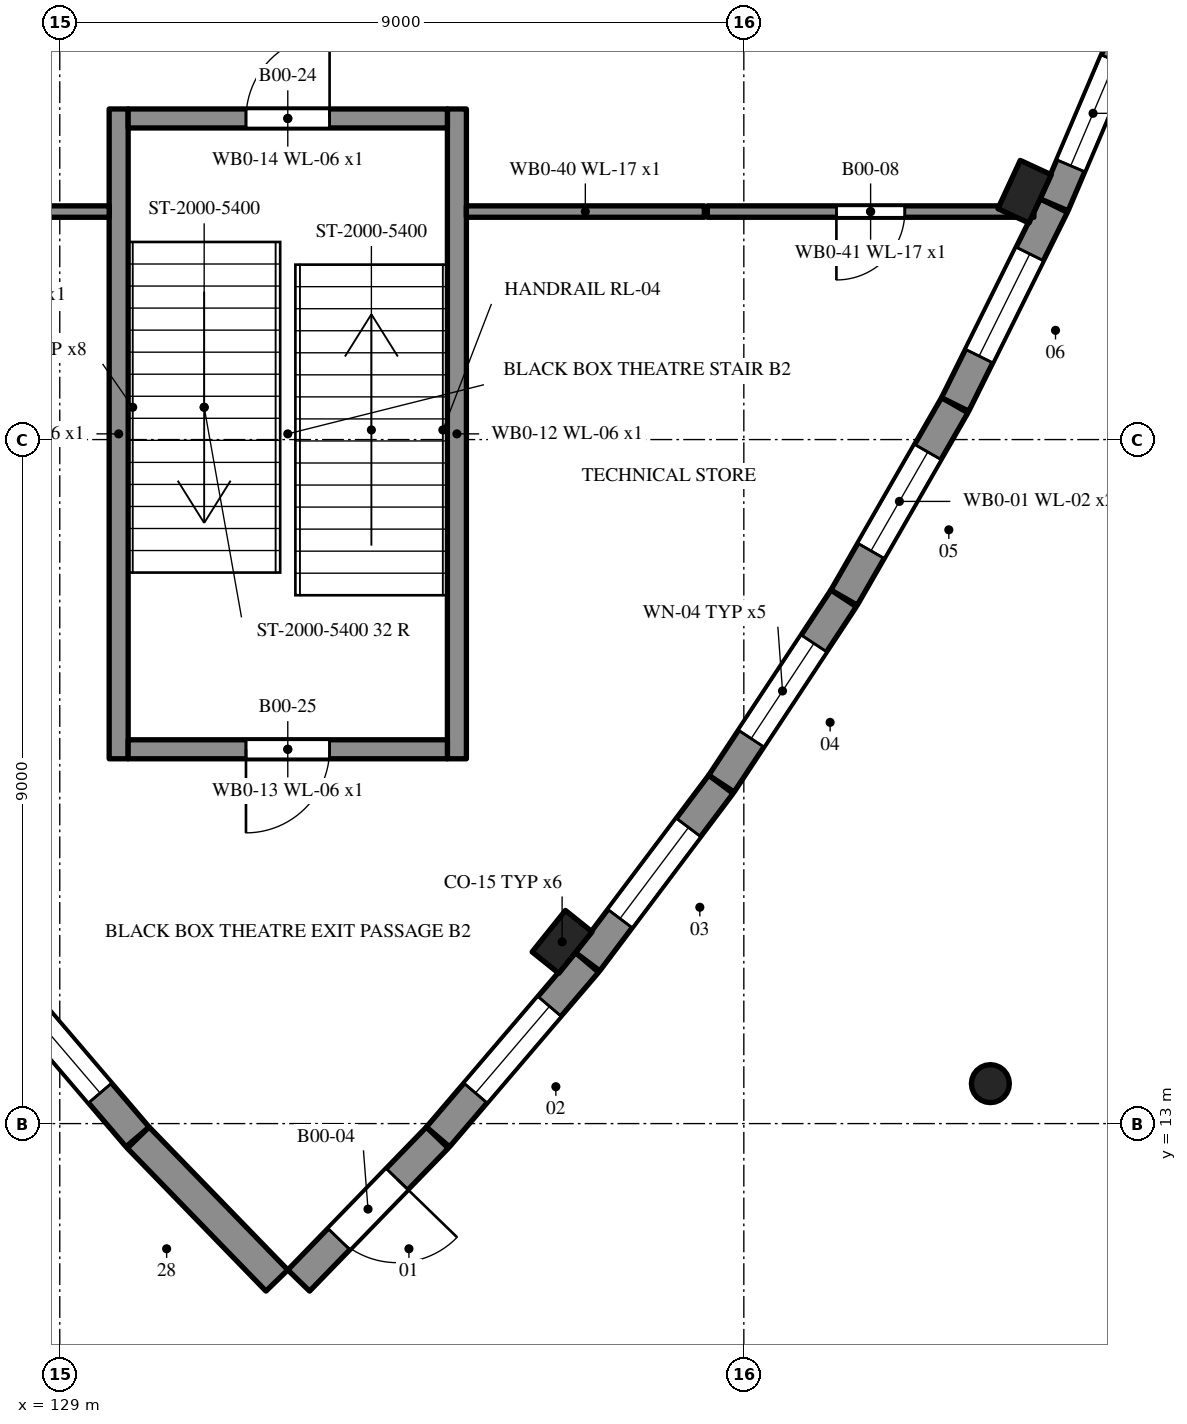
"""IFC4 building model, lengths in metres.
Left out: names, types, materials, properties, quantities, classifications, styles, units other than length and angle.
Written with IfcOpenShell. Run it as: python <this file> out.ifc"""

import sys

from ifc_helpers import new_model, si_unit, direction, frame, frame_2d, origin, origin_2d, place, context, subcontext, project, spatial, rectangle, circle, extrude, element, fill, save


model = new_model("IFC4")
c1 = context("Model", 3, precision=1e-05, world=origin(), true_north=direction((0.0, 1.0)))
c2 = subcontext(c1, "Body", "Model", "MODEL_VIEW")
j1 = project(units=[si_unit("LENGTHUNIT", "METRE"), si_unit("PLANEANGLEUNIT", "RADIAN")], contexts=[c1])
p1 = place(None, origin())
s1 = spatial("IfcSite", under=j1, at=p1, CompositionType="ELEMENT")
p2 = place(p1, origin())
s2 = spatial("IfcBuilding", under=s1, at=p2, CompositionType="ELEMENT")
p3 = place(p2, origin())
s3 = spatial("IfcBuildingStorey", under=s2, at=p3, CompositionType="ELEMENT", Elevation=0.0)
p4 = place(p3, frame((141.244, 13.526, -0.25), z_axis=(0.0, 0.0, 1.0), x_axis=(1.0, 0.0, 0.0)))
e1 = element("IfcColumn", 1, at=p4, inside=s3, PredefinedType="COLUMN", context=c2, shape_type="SweptSolid", body=[
    extrude(circle(Radius=0.25, at=origin_2d()), origin(), (0.0, 0.0, 1.0), 5.45),
])
p5 = place(p3, frame((132.144, 10.935, 0.0), z_axis=(0.0, 0.0, 1.0), x_axis=(0.696353968975, 0.71769850905, 0.0)))
e2 = element("IfcWall", 2, at=p5, inside=s3, PredefinedType="SOLIDWALL", context=c2, shape_type="SweptSolid", body=[
    extrude(rectangle(XDim=2.619, YDim=0.4, at=frame_2d((1.31, 0.0))), origin(), (0.0, 0.0, 1.0), 5.1),
])
p6 = place(p5, frame((0.76, 0.0, 0.0)))
e3 = element("IfcOpeningElement", 3, at=p6, cuts=e2, PredefinedType="OPENING", context=c2, shape_type="SweptSolid", body=[
    extrude(rectangle(XDim=1.1, YDim=2.1, at=frame_2d((0.55, 1.05))), frame((0.0, 0.21, 0.0), z_axis=(0.0, -1.0, 0.0), x_axis=(1.0, 0.0, 0.0)), (0.0, 0.0, 1.0), 0.42),
])
p7 = place(p3, frame((133.976, 12.824, 0.0), z_axis=(0.0, 0.0, 1.0), x_axis=(0.649458578854, 0.760396971557, 0.0)))
e4 = element("IfcWall", 4, at=p7, inside=s3, PredefinedType="SOLIDWALL", context=c2, shape_type="SweptSolid", body=[
    extrude(rectangle(XDim=3.019, YDim=0.4, at=frame_2d((1.51, 0.0))), origin(), (0.0, 0.0, 1.0), 5.1),
])
p8 = place(p7, frame((0.76, 0.0, 2.4)))
e5 = element("IfcOpeningElement", 5, at=p8, cuts=e4, PredefinedType="OPENING", context=c2, shape_type="SweptSolid", body=[
    extrude(rectangle(XDim=1.5, YDim=0.9, at=frame_2d((0.75, 0.45))), frame((0.0, 0.21, 0.0), z_axis=(0.0, -1.0, 0.0), x_axis=(1.0, 0.0, 0.0)), (0.0, 0.0, 1.0), 0.42),
])
p9 = place(p3, frame((135.945, 15.13, 0.0), z_axis=(0.0, 0.0, 1.0), x_axis=(0.600829330321, 0.799377330068, 0.0)))
e6 = element("IfcWall", 6, at=p9, inside=s3, PredefinedType="SOLIDWALL", context=c2, shape_type="SweptSolid", body=[
    extrude(rectangle(XDim=2.919, YDim=0.4, at=frame_2d((1.459, 0.0))), origin(), (0.0, 0.0, 1.0), 5.1),
])
p10 = place(p9, frame((0.71, 0.0, 2.4)))
e7 = element("IfcOpeningElement", 7, at=p10, cuts=e6, PredefinedType="OPENING", context=c2, shape_type="SweptSolid", body=[
    extrude(rectangle(XDim=1.5, YDim=0.9, at=frame_2d((0.75, 0.45))), frame((0.0, 0.21, 0.0), z_axis=(0.0, -1.0, 0.0), x_axis=(1.0, 0.0, 0.0)), (0.0, 0.0, 1.0), 0.42),
])
p11 = place(p3, frame((137.706, 17.474, 0.0), z_axis=(0.0, 0.0, 1.0), x_axis=(0.550602185206, 0.834767772285, 0.0)))
e8 = element("IfcWall", 8, at=p11, inside=s3, PredefinedType="SOLIDWALL", context=c2, shape_type="SweptSolid", body=[
    extrude(rectangle(XDim=2.919, YDim=0.4, at=frame_2d((1.46, 0.0))), origin(), (0.0, 0.0, 1.0), 5.1),
])
p12 = place(p11, frame((0.71, 0.0, 2.4)))
e9 = element("IfcOpeningElement", 9, at=p12, cuts=e8, PredefinedType="OPENING", context=c2, shape_type="SweptSolid", body=[
    extrude(rectangle(XDim=1.5, YDim=0.9, at=frame_2d((0.75, 0.45))), frame((0.0, 0.21, 0.0), z_axis=(0.0, -1.0, 0.0), x_axis=(1.0, 0.0, 0.0)), (0.0, 0.0, 1.0), 0.42),
])
p13 = place(p3, frame((139.319, 19.921, 0.0), z_axis=(0.0, 0.0, 1.0), x_axis=(0.498406705095, 0.866943340892, 0.0)))
e10 = element("IfcWall", 10, at=p13, inside=s3, PredefinedType="SOLIDWALL", context=c2, shape_type="SweptSolid", body=[
    extrude(rectangle(XDim=2.919, YDim=0.4, at=frame_2d((1.46, 0.0))), origin(), (0.0, 0.0, 1.0), 5.1),
])
p14 = place(p13, frame((0.71, 0.0, 2.4)))
e11 = element("IfcOpeningElement", 11, at=p14, cuts=e10, PredefinedType="OPENING", context=c2, shape_type="SweptSolid", body=[
    extrude(rectangle(XDim=1.5, YDim=0.9, at=frame_2d((0.75, 0.45))), frame((0.0, 0.21, 0.0), z_axis=(0.0, -1.0, 0.0), x_axis=(1.0, 0.0, 0.0)), (0.0, 0.0, 1.0), 0.42),
])
p15 = place(p3, frame((140.78, 22.463, 0.0), z_axis=(0.0, 0.0, 1.0), x_axis=(0.44433489597, 0.895860759395, 0.0)))
e12 = element("IfcWall", 12, at=p15, inside=s3, PredefinedType="SOLIDWALL", context=c2, shape_type="SweptSolid", body=[
    extrude(rectangle(XDim=2.92, YDim=0.4, at=frame_2d((1.46, 0.0))), origin(), (0.0, 0.0, 1.0), 5.1),
])
p16 = place(p15, frame((0.71, 0.0, 2.4)))
e13 = element("IfcOpeningElement", 13, at=p16, cuts=e12, PredefinedType="OPENING", context=c2, shape_type="SweptSolid", body=[
    extrude(rectangle(XDim=1.5, YDim=0.9, at=frame_2d((0.75, 0.45))), frame((0.0, 0.21, 0.0), z_axis=(0.0, -1.0, 0.0), x_axis=(1.0, 0.0, 0.0)), (0.0, 0.0, 1.0), 0.42),
])
p17 = place(p3, frame((142.083, 25.089, 0.0), z_axis=(0.0, 0.0, 1.0), x_axis=(0.391529943778, 0.920165367271, 0.0)))
e14 = element("IfcWall", 14, at=p17, inside=s3, PredefinedType="SOLIDWALL", context=c2, shape_type="SweptSolid", body=[
    extrude(rectangle(XDim=2.616, YDim=0.4, at=frame_2d((1.308, 0.0))), origin(), (0.0, 0.0, 1.0), 5.1),
])
p18 = place(p17, frame((0.558, 0.0, 0.3)))
e15 = element("IfcOpeningElement", 15, at=p18, cuts=e14, PredefinedType="OPENING", context=c2, shape_type="SweptSolid", body=[
    extrude(rectangle(XDim=1.5, YDim=2.7, at=frame_2d((0.75, 1.35))), frame((0.0, 0.21, 0.0), z_axis=(0.0, -1.0, 0.0), x_axis=(1.0, 0.0, 0.0)), (0.0, 0.0, 1.0), 0.42),
])
p19 = place(p3, frame((128.063, 15.12, 0.0), z_axis=(0.0, 0.0, 1.0), x_axis=(0.649458578854, -0.760396971557, 0.0)))
e16 = element("IfcWall", 16, at=p19, inside=s3, PredefinedType="SOLIDWALL", context=c2, shape_type="SweptSolid", body=[
    extrude(rectangle(XDim=3.019, YDim=0.4, at=frame_2d((1.51, 0.0))), origin(), (0.0, 0.0, 1.0), 5.1),
])
p20 = place(p19, frame((0.76, 0.0, 2.4)))
e17 = element("IfcOpeningElement", 17, at=p20, cuts=e16, PredefinedType="OPENING", context=c2, shape_type="SweptSolid", body=[
    extrude(rectangle(XDim=1.5, YDim=0.9, at=frame_2d((0.75, 0.45))), frame((0.0, 0.21, 0.0), z_axis=(0.0, -1.0, 0.0), x_axis=(1.0, 0.0, 0.0)), (0.0, 0.0, 1.0), 0.42),
])
p21 = place(p3, frame((130.032, 12.815, 0.0), z_axis=(0.0, 0.0, 1.0), x_axis=(0.696353968975, -0.71769850905, 0.0)))
e18 = element("IfcWall", 18, at=p21, inside=s3, PredefinedType="SOLIDWALL", context=c2, shape_type="SweptSolid", body=[
    extrude(rectangle(XDim=2.619, YDim=0.4, at=frame_2d((1.31, 0.0))), origin(), (0.0, 0.0, 1.0), 5.1),
])
for number, where, z_axis, x_axis in (
    (19, (135.609, 15.391, 0.0), (0.0, 0.0, 1.0), (0.626, 0.78, 0.0)),
    (20, (141.694, 25.261, 0.0), (0.0, 0.0, 1.0), (0.42, 0.908, 0.0)),
):
    element("IfcColumn", number, at=place(p3, frame(where, z_axis=z_axis, x_axis=x_axis)), inside=s3, PredefinedType="PILASTER", context=c2, shape_type="SweptSolid", body=[
        extrude(rectangle(XDim=0.7, YDim=0.45, at=origin_2d()), origin(), (0.0, 0.0, 1.0), 5.1),
    ])
for number, where, z_axis, x_axis in (
    (21, (129.775, 26.35, 0.0), (0.0, 0.0, 1.0), (0.0, -1.0, 0.0)),
    (22, (134.225, 17.8, 0.0), (0.0, 0.0, 1.0), (0.0, 1.0, 0.0)),
):
    element("IfcWall", number, at=place(p3, frame(where, z_axis=z_axis, x_axis=x_axis)), inside=s3, PredefinedType="SHEAR", context=c2, shape_type="SweptSolid", body=[
        extrude(rectangle(XDim=8.55, YDim=0.25, at=frame_2d((4.275, 0.0))), origin(), (0.0, 0.0, 1.0), 5.4),
    ])
p22 = place(p3, frame((134.1, 17.925, 0.0), z_axis=(0.0, 0.0, 1.0), x_axis=(-1.0, 0.0, 0.0)))
e23 = element("IfcWall", 23, at=p22, inside=s3, PredefinedType="SHEAR", context=c2, shape_type="SweptSolid", body=[
    extrude(rectangle(XDim=4.2, YDim=0.25, at=frame_2d((2.1, 0.0))), origin(), (0.0, 0.0, 1.0), 5.4),
])
p23 = place(p22, frame((1.55, 0.0, 0.0)))
e24 = element("IfcOpeningElement", 24, at=p23, cuts=e23, PredefinedType="OPENING", context=c2, shape_type="SweptSolid", body=[
    extrude(rectangle(XDim=1.1, YDim=2.1, at=frame_2d((0.55, 1.05))), frame((0.0, 0.135, 0.0), z_axis=(0.0, -1.0, 0.0), x_axis=(1.0, 0.0, 0.0)), (0.0, 0.0, 1.0), 0.27),
])
p24 = place(p3, frame((129.9, 26.225, 0.0), z_axis=(0.0, 0.0, 1.0), x_axis=(1.0, 0.0, 0.0)))
e25 = element("IfcWall", 25, at=p24, inside=s3, PredefinedType="SHEAR", context=c2, shape_type="SweptSolid", body=[
    extrude(rectangle(XDim=4.2, YDim=0.25, at=frame_2d((2.1, 0.0))), origin(), (0.0, 0.0, 1.0), 5.4),
])
p25 = place(p24, frame((1.55, 0.0, 0.0)))
e26 = element("IfcOpeningElement", 26, at=p25, cuts=e25, PredefinedType="OPENING", context=c2, shape_type="SweptSolid", body=[
    extrude(rectangle(XDim=1.1, YDim=2.1, at=frame_2d((0.55, 1.05))), frame((0.0, 0.135, 0.0), z_axis=(0.0, -1.0, 0.0), x_axis=(1.0, 0.0, 0.0)), (0.0, 0.0, 1.0), 0.27),
])
p26 = place(p3, frame((129.65, 25.0, 0.0), z_axis=(0.0, 0.0, 1.0), x_axis=(-1.0, 0.0, 0.0)))
e27 = element("IfcWall", 27, at=p26, inside=s3, PredefinedType="PARTITIONING", context=c2, shape_type="SweptSolid", body=[
    extrude(rectangle(XDim=3.13, YDim=0.15, at=frame_2d((1.565, 0.0))), origin(), (0.0, 0.0, 1.0), 5.1),
])
p27 = place(p26, frame((1.065, 0.0, 0.0)))
e28 = element("IfcOpeningElement", 28, at=p27, cuts=e27, PredefinedType="OPENING", context=c2, shape_type="SweptSolid", body=[
    extrude(rectangle(XDim=1.0, YDim=2.1, at=frame_2d((0.5, 1.05))), frame((0.0, 0.085, 0.0), z_axis=(0.0, -1.0, 0.0), x_axis=(1.0, 0.0, 0.0)), (0.0, 0.0, 1.0), 0.17),
])
p28 = place(p3, frame((137.48, 25.0, 0.0), z_axis=(0.0, 0.0, 1.0), x_axis=(-1.0, 0.0, 0.0)))
e29 = element("IfcWall", 29, at=p28, inside=s3, PredefinedType="PARTITIONING", context=c2, shape_type="SweptSolid", body=[
    extrude(rectangle(XDim=3.13, YDim=0.15, at=frame_2d((1.565, 0.0))), origin(), (0.0, 0.0, 1.0), 5.1),
])
p29 = place(p3, frame((141.816, 25.0, 0.0), z_axis=(0.0, 0.0, 1.0), x_axis=(-1.0, 0.0, 0.0)))
e30 = element("IfcWall", 30, at=p29, inside=s3, PredefinedType="PARTITIONING", context=c2, shape_type="SweptSolid", body=[
    extrude(rectangle(XDim=4.296, YDim=0.15, at=frame_2d((2.148, 0.0))), origin(), (0.0, 0.0, 1.0), 5.1),
])
p30 = place(p29, frame((1.698, 0.0, 0.0)))
e31 = element("IfcOpeningElement", 31, at=p30, cuts=e30, PredefinedType="OPENING", context=c2, shape_type="SweptSolid", body=[
    extrude(rectangle(XDim=0.9, YDim=2.1, at=frame_2d((0.45, 1.05))), frame((0.0, 0.085, 0.0), z_axis=(0.0, -1.0, 0.0), x_axis=(1.0, 0.0, 0.0)), (0.0, 0.0, 1.0), 0.17),
])
p31 = place(p6, frame((1.1, 0.0, 0.0), z_axis=(0.0, 0.0, 1.0), x_axis=(-1.0, 0.0, 0.0)))
e32 = element("IfcDoor", 32, at=p31, inside=s3, OperationType="SINGLE_SWING_LEFT", PredefinedType="DOOR", context=c2, shape_type="SweptSolid", body=[
    extrude(rectangle(XDim=1.1, YDim=2.1, at=frame_2d((0.55, 1.05))), frame((0.0, 0.025, 0.0), z_axis=(0.0, -1.0, 0.0), x_axis=(1.0, 0.0, 0.0)), (0.0, 0.0, 1.0), 0.05),
])
fill(e3, e32)
p32 = place(p8, origin())
e33 = element("IfcWindow", 33, at=p32, inside=s3, PartitioningType="SINGLE_PANEL", PredefinedType="WINDOW", context=c2, shape_type="SweptSolid", body=[
    extrude(rectangle(XDim=1.5, YDim=0.9, at=frame_2d((0.75, 0.45))), frame((0.0, 0.03, 0.0), z_axis=(0.0, -1.0, 0.0), x_axis=(1.0, 0.0, 0.0)), (0.0, 0.0, 1.0), 0.06),
])
fill(e5, e33)
p33 = place(p10, origin())
e34 = element("IfcWindow", 34, at=p33, inside=s3, PartitioningType="SINGLE_PANEL", PredefinedType="WINDOW", context=c2, shape_type="SweptSolid", body=[
    extrude(rectangle(XDim=1.5, YDim=0.9, at=frame_2d((0.75, 0.45))), frame((0.0, 0.03, 0.0), z_axis=(0.0, -1.0, 0.0), x_axis=(1.0, 0.0, 0.0)), (0.0, 0.0, 1.0), 0.06),
])
fill(e7, e34)
p34 = place(p12, origin())
e35 = element("IfcWindow", 35, at=p34, inside=s3, PartitioningType="SINGLE_PANEL", PredefinedType="WINDOW", context=c2, shape_type="SweptSolid", body=[
    extrude(rectangle(XDim=1.5, YDim=0.9, at=frame_2d((0.75, 0.45))), frame((0.0, 0.03, 0.0), z_axis=(0.0, -1.0, 0.0), x_axis=(1.0, 0.0, 0.0)), (0.0, 0.0, 1.0), 0.06),
])
fill(e9, e35)
p35 = place(p14, origin())
e36 = element("IfcWindow", 36, at=p35, inside=s3, PartitioningType="SINGLE_PANEL", PredefinedType="WINDOW", context=c2, shape_type="SweptSolid", body=[
    extrude(rectangle(XDim=1.5, YDim=0.9, at=frame_2d((0.75, 0.45))), frame((0.0, 0.03, 0.0), z_axis=(0.0, -1.0, 0.0), x_axis=(1.0, 0.0, 0.0)), (0.0, 0.0, 1.0), 0.06),
])
fill(e11, e36)
p36 = place(p16, origin())
e37 = element("IfcWindow", 37, at=p36, inside=s3, PartitioningType="SINGLE_PANEL", PredefinedType="WINDOW", context=c2, shape_type="SweptSolid", body=[
    extrude(rectangle(XDim=1.5, YDim=0.9, at=frame_2d((0.75, 0.45))), frame((0.0, 0.03, 0.0), z_axis=(0.0, -1.0, 0.0), x_axis=(1.0, 0.0, 0.0)), (0.0, 0.0, 1.0), 0.06),
])
fill(e13, e37)
p37 = place(p18, origin())
e38 = element("IfcWindow", 38, at=p37, inside=s3, PartitioningType="SINGLE_PANEL", PredefinedType="WINDOW", context=c2, shape_type="SweptSolid", body=[
    extrude(rectangle(XDim=1.5, YDim=2.7, at=frame_2d((0.75, 1.35))), frame((0.0, 0.03, 0.0), z_axis=(0.0, -1.0, 0.0), x_axis=(1.0, 0.0, 0.0)), (0.0, 0.0, 1.0), 0.06),
])
fill(e15, e38)
p38 = place(p20, origin())
e39 = element("IfcWindow", 39, at=p38, inside=s3, PartitioningType="SINGLE_PANEL", PredefinedType="WINDOW", context=c2, shape_type="SweptSolid", body=[
    extrude(rectangle(XDim=1.5, YDim=0.9, at=frame_2d((0.75, 0.45))), frame((0.0, 0.03, 0.0), z_axis=(0.0, -1.0, 0.0), x_axis=(1.0, 0.0, 0.0)), (0.0, 0.0, 1.0), 0.06),
])
fill(e17, e39)
p39 = place(p30, origin())
e40 = element("IfcDoor", 40, at=p39, inside=s3, OperationType="SINGLE_SWING_RIGHT", PredefinedType="DOOR", context=c2, shape_type="SweptSolid", body=[
    extrude(rectangle(XDim=0.9, YDim=2.1, at=frame_2d((0.45, 1.05))), frame((0.0, 0.025, 0.0), z_axis=(0.0, -1.0, 0.0), x_axis=(1.0, 0.0, 0.0)), (0.0, 0.0, 1.0), 0.05),
])
fill(e31, e40)
p40 = place(p25, origin())
e41 = element("IfcDoor", 41, at=p40, inside=s3, OperationType="SINGLE_SWING_RIGHT", PredefinedType="DOOR", context=c2, shape_type="SweptSolid", body=[
    extrude(rectangle(XDim=1.1, YDim=2.1, at=frame_2d((0.55, 1.05))), frame((0.0, 0.025, 0.0), z_axis=(0.0, -1.0, 0.0), x_axis=(1.0, 0.0, 0.0)), (0.0, 0.0, 1.0), 0.05),
])
fill(e26, e41)
p41 = place(p23, origin())
e42 = element("IfcDoor", 42, at=p41, inside=s3, OperationType="SINGLE_SWING_RIGHT", PredefinedType="DOOR", context=c2, shape_type="SweptSolid", body=[
    extrude(rectangle(XDim=1.1, YDim=2.1, at=frame_2d((0.55, 1.05))), frame((0.0, 0.025, 0.0), z_axis=(0.0, -1.0, 0.0), x_axis=(1.0, 0.0, 0.0)), (0.0, 0.0, 1.0), 0.05),
])
fill(e24, e42)
save(model, sys.argv[1])
